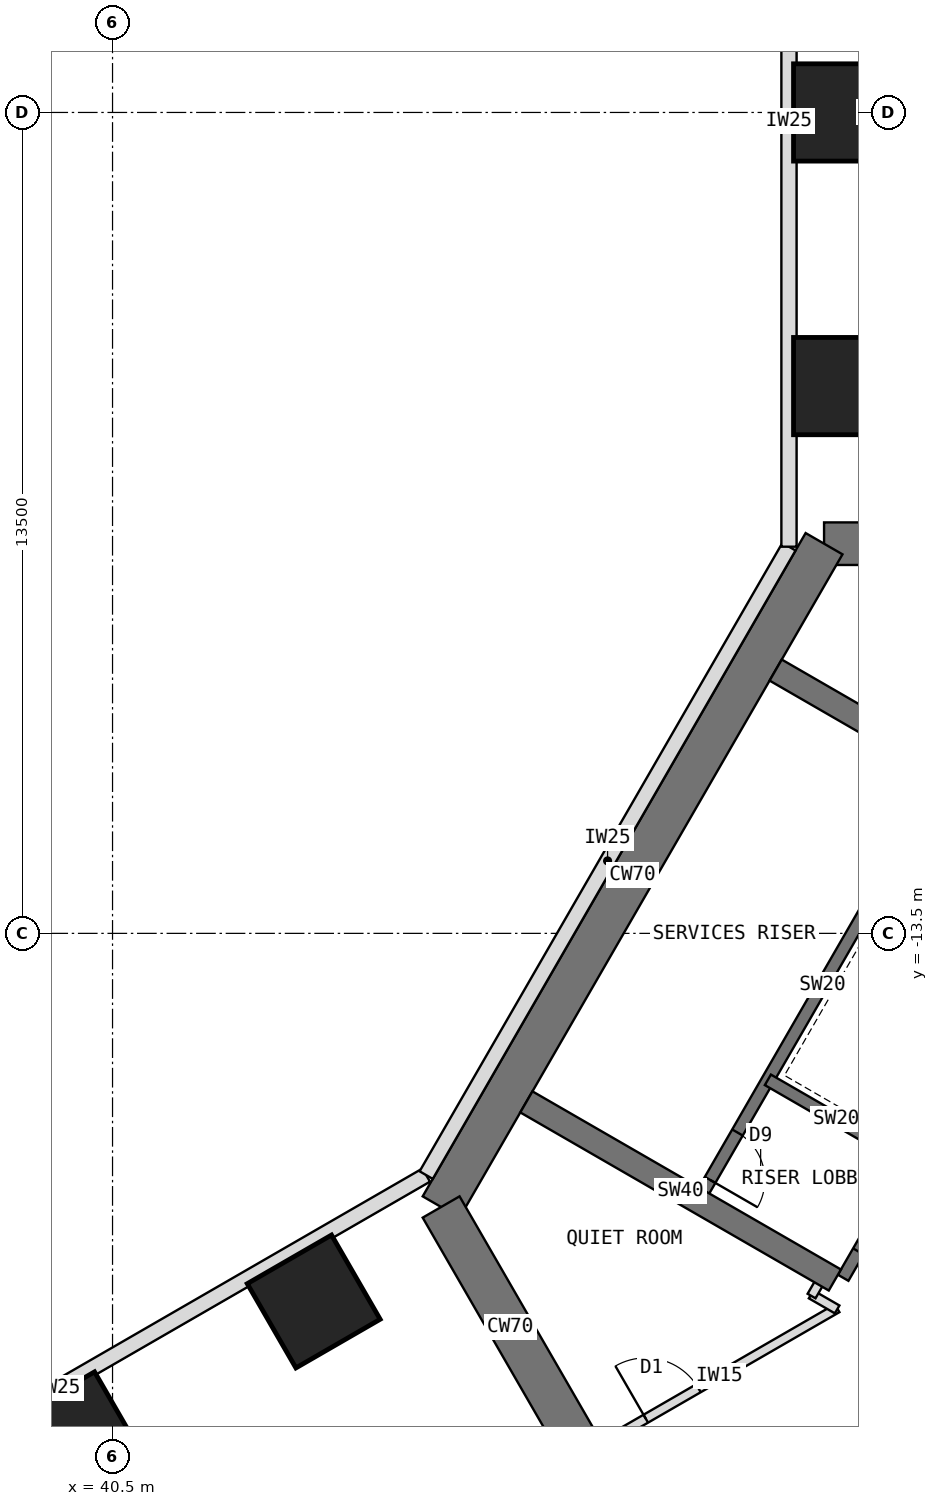
"""IFC4 building model, lengths in metres.
Left out: names, types, materials, properties, quantities, classifications, styles, units other than length and angle.
Written with IfcOpenShell. Run it as: python <this file> out.ifc"""

import sys

from ifc_helpers import new_model, si_unit, direction, frame, frame_2d, origin, origin_2d, place, context, subcontext, project, spatial, rectangle, extrude, element, fill, save


model = new_model("IFC4")
c1 = context("Model", 3, precision=1e-05, world=origin(), true_north=direction((0.0, 1.0)))
c2 = subcontext(c1, "Body", "Model", "MODEL_VIEW")
j1 = project(units=[si_unit("LENGTHUNIT", "METRE"), si_unit("PLANEANGLEUNIT", "RADIAN")], contexts=[c1])
p1 = place(None, origin())
s1 = spatial("IfcSite", under=j1, at=p1, CompositionType="ELEMENT")
p2 = place(p1, origin())
s2 = spatial("IfcBuilding", under=s1, at=p2, CompositionType="ELEMENT")
p3 = place(p2, frame((0.0, 0.0, 5.5)))
s3 = spatial("IfcBuildingStorey", under=s2, at=p3, CompositionType="ELEMENT", Elevation=5.5)
for number, where, z_axis, x_axis in (
    (1, (40.5, -13.5, 0.0), (0.0, 0.0, 1.0), (1.0, 0.0, 0.0)),
    (2, (40.5, 0.0, 0.0), (0.0, 0.0, 1.0), (1.0, 0.0, 0.0)),
):
    element("IfcColumn", number, at=place(p3, frame(where, z_axis=z_axis, x_axis=x_axis)), inside=s3, PredefinedType="COLUMN", context=c2, shape_type="SweptSolid", body=[
        extrude(rectangle(XDim=1.5, YDim=1.5, at=origin_2d()), origin(), (0.0, 0.0, 1.0), 5.0),
    ])
p4 = place(p3, frame((56.75, -7.092, 0.0), z_axis=(0.0, 0.0, 1.0), x_axis=(-1.0, 0.0, 0.0)))
e3 = element("IfcWall", 3, at=p4, inside=s3, PredefinedType="SHEAR", context=c2, shape_type="SweptSolid", body=[
    extrude(rectangle(XDim=4.548, YDim=0.7, at=frame_2d((2.274, 0.0))), origin(), (0.0, 0.0, 1.0), 5.0),
])
p5 = place(p3, frame((52.202, -7.092, 0.0), z_axis=(0.0, 0.0, 1.0), x_axis=(-0.500005998175, -0.866021940709, 0.0)))
e4 = element("IfcWall", 4, at=p5, inside=s3, PredefinedType="SHEAR", context=c2, shape_type="SweptSolid", body=[
    extrude(rectangle(XDim=12.596, YDim=0.7, at=frame_2d((6.298, 0.0))), origin(), (0.0, 0.0, 1.0), 5.0),
])
p6 = place(p3, frame((45.904, -18.0, 0.0), z_axis=(0.0, 0.0, 1.0), x_axis=(0.500024481964, -0.866011268655, 0.0)))
e5 = element("IfcWall", 5, at=p6, inside=s3, PredefinedType="SHEAR", context=c2, shape_type="SweptSolid", body=[
    extrude(rectangle(XDim=4.548, YDim=0.7, at=frame_2d((2.274, 0.0))), origin(), (0.0, 0.0, 1.0), 5.0),
])
for number, where, z_axis, x_axis in (
    (6, (52.5, -4.5, 0.0), (0.0, 0.0, 1.0), (1.0, 0.0, 0.0)),
    (7, (52.5, 0.0, 0.0), (0.0, 0.0, 1.0), (1.0, 0.0, 0.0)),
    (8, (43.809, -19.554, 0.0), (0.0, 0.0, 1.0), (0.866, 0.5, 0.0)),
    (9, (39.912, -21.804, 0.0), (0.0, 0.0, 1.0), (0.866, 0.5, 0.0)),
):
    element("IfcColumn", number, at=place(p3, frame(where, z_axis=z_axis, x_axis=x_axis)), inside=s3, PredefinedType="COLUMN", context=c2, shape_type="SweptSolid", body=[
        extrude(rectangle(XDim=1.6, YDim=1.6, at=origin_2d()), origin(), (0.0, 0.0, 1.0), 5.0),
    ])
p7 = place(p3, frame((56.516, -12.236, 0.0), z_axis=(0.0, 0.0, 1.0), x_axis=(-0.49999894854, -0.866026010844, 0.0)))
e10 = element("IfcWall", 10, at=p7, inside=s3, PredefinedType="SHEAR", context=c2, shape_type="SweptSolid", body=[
    extrude(rectangle(XDim=8.0, YDim=0.2, at=frame_2d((4.0, 0.0))), origin(), (0.0, 0.0, 1.0), 5.0),
])
p8 = place(p7, frame((6.3, 0.0, 0.0)))
e11 = element("IfcOpeningElement", 11, at=p8, cuts=e10, PredefinedType="OPENING", context=c2, shape_type="SweptSolid", body=[
    extrude(rectangle(XDim=1.2, YDim=2.1, at=frame_2d((0.6, 1.05))), frame((0.0, 0.11, 0.0), z_axis=(0.0, -1.0, 0.0), x_axis=(1.0, 0.0, 0.0)), (0.0, 0.0, 1.0), 0.22),
])
for number, where, z_axis, x_axis in (
    (12, (54.98, -14.697, 0.0), (0.0, 0.0, 1.0), (-0.866, 0.5, 0.0)),
    (13, (53.53, -17.209, 0.0), (0.0, 0.0, 1.0), (-0.866, 0.5, 0.0)),
):
    element("IfcWall", number, at=place(p3, frame(where, z_axis=z_axis, x_axis=x_axis)), inside=s3, PredefinedType="SHEAR", context=c2, shape_type="SweptSolid", body=[
        extrude(rectangle(XDim=2.6, YDim=0.2, at=frame_2d((1.3, 0.0))), origin(), (0.0, 0.0, 1.0), 5.0),
    ])
p9 = place(p3, frame((54.178, -10.886, 0.0), z_axis=(0.0, 0.0, 1.0), x_axis=(-0.49999894854, -0.866026010844, 0.0)))
e14 = element("IfcWall", 14, at=p9, inside=s3, PredefinedType="SHEAR", context=c2, shape_type="SweptSolid", body=[
    extrude(rectangle(XDim=8.0, YDim=0.2, at=frame_2d((4.0, 0.0))), origin(), (0.0, 0.0, 1.0), 5.0),
])
p10 = place(p9, frame((6.8, 0.0, 0.0)))
e15 = element("IfcOpeningElement", 15, at=p10, cuts=e14, PredefinedType="OPENING", context=c2, shape_type="SweptSolid", body=[
    extrude(rectangle(XDim=0.9, YDim=2.1, at=frame_2d((0.45, 1.05))), frame((0.0, 0.11, 0.0), z_axis=(0.0, -1.0, 0.0), x_axis=(1.0, 0.0, 0.0)), (0.0, 0.0, 1.0), 0.22),
])
for number, where, z_axis, x_axis in (
    (16, (52.38, -19.201, 0.0), (0.0, 0.0, 1.0), (-0.866, 0.5, 0.0)),
    (17, (56.48, -12.099, 0.0), (0.0, 0.0, 1.0), (-0.866, 0.5, 0.0)),
):
    element("IfcWall", number, at=place(p3, frame(where, z_axis=z_axis, x_axis=x_axis)), inside=s3, PredefinedType="SHEAR", context=c2, shape_type="SweptSolid", body=[
        extrude(rectangle(XDim=5.858, YDim=0.4, at=frame_2d((2.929, 0.0))), origin(), (0.0, 0.0, 1.0), 5.0),
    ])
p11 = place(p3, frame((48.548, -21.898, 0.0), z_axis=(0.0, 0.0, 1.0), x_axis=(0.866025445582, 0.499999927604, 0.0)))
e18 = element("IfcWall", 18, at=p11, inside=s3, PredefinedType="PARTITIONING", context=c2, shape_type="SweptSolid", body=[
    extrude(rectangle(XDim=4.468, YDim=0.15, at=frame_2d((2.234, 0.0))), origin(), (0.0, 0.0, 1.0), 4.65),
])
p12 = place(p11, frame((0.834, 0.0, 0.0)))
e19 = element("IfcOpeningElement", 19, at=p12, cuts=e18, PredefinedType="OPENING", context=c2, shape_type="SweptSolid", body=[
    extrude(rectangle(XDim=1.0, YDim=2.1, at=frame_2d((0.5, 1.05))), frame((0.0, 0.085, 0.0), z_axis=(0.0, -1.0, 0.0), x_axis=(1.0, 0.0, 0.0)), (0.0, 0.0, 1.0), 0.17),
])
p13 = place(p3, frame((52.417, -19.684, 0.0), z_axis=(0.0, 0.0, 1.0), x_axis=(-0.865831790172, 0.50033519877, 0.0)))
e20 = element("IfcWall", 20, at=p13, inside=s3, PredefinedType="PARTITIONING", context=c2, shape_type="SweptSolid", body=[
    extrude(rectangle(XDim=0.494, YDim=0.15, at=frame_2d((0.247, 0.0))), origin(), (0.0, 0.0, 1.0), 4.65),
])
p14 = place(p3, frame((51.997, -19.464, 0.0), z_axis=(0.0, 0.0, 1.0), x_axis=(0.499804398801, 0.866138304741, 0.0)))
e21 = element("IfcWall", 21, at=p14, inside=s3, PredefinedType="PARTITIONING", context=c2, shape_type="SweptSolid", body=[
    extrude(rectangle(XDim=0.43, YDim=0.15, at=frame_2d((0.215, 0.0))), origin(), (0.0, 0.0, 1.0), 4.65),
])
p15 = place(p3, frame((40.5, -20.252, 0.0), z_axis=(0.0, 0.0, 1.0), x_axis=(0.0, 1.0, 0.0)))
e22 = element("IfcWall", 22, at=p15, inside=s3, PredefinedType="PARTITIONING", context=c2, shape_type="SweptSolid", body=[
    extrude(rectangle(XDim=6.752, YDim=0.2, at=frame_2d((3.376, 0.0))), origin(), (0.0, 0.0, 1.0), 4.65),
])
p16 = place(p15, frame((2.476, 0.0, 0.0)))
e23 = element("IfcOpeningElement", 23, at=p16, cuts=e22, PredefinedType="OPENING", context=c2, shape_type="SweptSolid", body=[
    extrude(rectangle(XDim=1.8, YDim=2.4, at=frame_2d((0.9, 1.2))), frame((0.0, 0.11, 0.0), z_axis=(0.0, -1.0, 0.0), x_axis=(1.0, 0.0, 0.0)), (0.0, 0.0, 1.0), 0.22),
])
p17 = place(p3, frame((27.0, -13.5, 0.0), z_axis=(0.0, 0.0, 1.0), x_axis=(1.0, 0.0, 0.0)))
e24 = element("IfcWall", 24, at=p17, inside=s3, PredefinedType="PARTITIONING", context=c2, shape_type="SweptSolid", body=[
    extrude(rectangle(XDim=13.5, YDim=0.2, at=frame_2d((6.75, 0.0))), origin(), (0.0, 0.0, 1.0), 3.25),
])
p18 = place(p3, frame((40.5, -13.5, 0.0), z_axis=(0.0, 0.0, 1.0), x_axis=(0.0, 1.0, 0.0)))
e25 = element("IfcWall", 25, at=p18, inside=s3, PredefinedType="PARTITIONING", context=c2, shape_type="SweptSolid", body=[
    extrude(rectangle(XDim=13.5, YDim=0.2, at=frame_2d((6.75, 0.0))), origin(), (0.0, 0.0, 1.0), 3.25),
])
p19 = place(p18, frame((5.85, 0.0, 0.0)))
e26 = element("IfcOpeningElement", 26, at=p19, cuts=e25, PredefinedType="OPENING", context=c2, shape_type="SweptSolid", body=[
    extrude(rectangle(XDim=1.8, YDim=2.4, at=frame_2d((0.9, 1.2))), frame((0.0, 0.11, 0.0), z_axis=(0.0, -1.0, 0.0), x_axis=(1.0, 0.0, 0.0)), (0.0, 0.0, 1.0), 0.22),
])
p20 = place(p3, frame((40.5, 0.0, 0.0), z_axis=(0.0, 0.0, 1.0), x_axis=(0.0, 1.0, 0.0)))
e27 = element("IfcWall", 27, at=p20, inside=s3, PredefinedType="PARTITIONING", context=c2, shape_type="SweptSolid", body=[
    extrude(rectangle(XDim=13.5, YDim=0.2, at=frame_2d((6.75, 0.0))), origin(), (0.0, 0.0, 1.0), 3.25),
])
p21 = place(p20, frame((5.85, 0.0, 0.0)))
e28 = element("IfcOpeningElement", 28, at=p21, cuts=e27, PredefinedType="OPENING", context=c2, shape_type="SweptSolid", body=[
    extrude(rectangle(XDim=1.8, YDim=2.4, at=frame_2d((0.9, 1.2))), frame((0.0, 0.11, 0.0), z_axis=(0.0, -1.0, 0.0), x_axis=(1.0, 0.0, 0.0)), (0.0, 0.0, 1.0), 0.22),
])
p22 = place(p3, frame((40.5, 0.0, 0.0), z_axis=(0.0, 0.0, 1.0), x_axis=(1.0, 0.0, 0.0)))
e29 = element("IfcWall", 29, at=p22, inside=s3, PredefinedType="PARTITIONING", context=c2, shape_type="SweptSolid", body=[
    extrude(rectangle(XDim=10.95, YDim=0.2, at=frame_2d((5.475, 0.0))), origin(), (0.0, 0.0, 1.0), 4.65),
])
p23 = place(p22, frame((4.575, 0.0, 0.0)))
e30 = element("IfcOpeningElement", 30, at=p23, cuts=e29, PredefinedType="OPENING", context=c2, shape_type="SweptSolid", body=[
    extrude(rectangle(XDim=1.8, YDim=2.4, at=frame_2d((0.9, 1.2))), frame((0.0, 0.11, 0.0), z_axis=(0.0, -1.0, 0.0), x_axis=(1.0, 0.0, 0.0)), (0.0, 0.0, 1.0), 0.22),
])
p24 = place(p3, frame((33.52, -24.484, 0.0), z_axis=(0.0, 0.0, 1.0), x_axis=(0.866027500821, 0.499996367808, 0.0)))
e31 = element("IfcWall", 31, at=p24, inside=s3, PredefinedType="STANDARD", context=c2, shape_type="SweptSolid", body=[
    extrude(rectangle(XDim=14.016, YDim=0.25, at=frame_2d((7.008, 0.0))), origin(), (0.0, 0.0, 1.0), 4.65),
])
p25 = place(p3, frame((45.658, -17.476, 0.0), z_axis=(0.0, 0.0, 1.0), x_axis=(0.499996365031, 0.866027502425, 0.0)))
e32 = element("IfcWall", 32, at=p25, inside=s3, PredefinedType="STANDARD", context=c2, shape_type="SweptSolid", body=[
    extrude(rectangle(XDim=11.933, YDim=0.25, at=frame_2d((5.967, 0.0))), origin(), (0.0, 0.0, 1.0), 4.65),
])
p26 = place(p3, frame((51.625, -7.141, 0.0), z_axis=(0.0, 0.0, 1.0), x_axis=(0.0, 1.0, 0.0)))
e33 = element("IfcWall", 33, at=p26, inside=s3, PredefinedType="STANDARD", context=c2, shape_type="SweptSolid", body=[
    extrude(rectangle(XDim=14.016, YDim=0.25, at=frame_2d((7.008, 0.0))), origin(), (0.0, 0.0, 1.0), 4.65),
])
p27 = place(p8, origin())
e34 = element("IfcDoor", 34, at=p27, inside=s3, OperationType="SINGLE_SWING_RIGHT", PredefinedType="DOOR", context=c2, shape_type="SweptSolid", body=[
    extrude(rectangle(XDim=1.2, YDim=2.1, at=frame_2d((0.6, 1.05))), frame((0.0, 0.025, 0.0), z_axis=(0.0, -1.0, 0.0), x_axis=(1.0, 0.0, 0.0)), (0.0, 0.0, 1.0), 0.05),
])
fill(e11, e34)
p28 = place(p10, origin())
e35 = element("IfcDoor", 35, at=p28, inside=s3, OperationType="SINGLE_SWING_RIGHT", PredefinedType="DOOR", context=c2, shape_type="SweptSolid", body=[
    extrude(rectangle(XDim=0.9, YDim=2.1, at=frame_2d((0.45, 1.05))), frame((0.0, 0.025, 0.0), z_axis=(0.0, -1.0, 0.0), x_axis=(1.0, 0.0, 0.0)), (0.0, 0.0, 1.0), 0.05),
])
fill(e15, e35)
p29 = place(p12, origin())
e36 = element("IfcDoor", 36, at=p29, inside=s3, OperationType="SINGLE_SWING_LEFT", PredefinedType="DOOR", context=c2, shape_type="SweptSolid", body=[
    extrude(rectangle(XDim=1.0, YDim=2.1, at=frame_2d((0.5, 1.05))), frame((0.0, 0.025, 0.0), z_axis=(0.0, -1.0, 0.0), x_axis=(1.0, 0.0, 0.0)), (0.0, 0.0, 1.0), 0.05),
])
fill(e19, e36)
p30 = place(p16, origin())
e37 = element("IfcDoor", 37, at=p30, inside=s3, OperationType="DOUBLE_DOOR_DOUBLE_SWING", PredefinedType="DOOR", context=c2, shape_type="SweptSolid", body=[
    extrude(rectangle(XDim=1.8, YDim=2.4, at=frame_2d((0.9, 1.2))), frame((0.0, 0.025, 0.0), z_axis=(0.0, -1.0, 0.0), x_axis=(1.0, 0.0, 0.0)), (0.0, 0.0, 1.0), 0.05),
])
fill(e23, e37)
p31 = place(p23, origin())
e38 = element("IfcDoor", 38, at=p31, inside=s3, OperationType="DOUBLE_DOOR_DOUBLE_SWING", PredefinedType="DOOR", context=c2, shape_type="SweptSolid", body=[
    extrude(rectangle(XDim=1.8, YDim=2.4, at=frame_2d((0.9, 1.2))), frame((0.0, 0.025, 0.0), z_axis=(0.0, -1.0, 0.0), x_axis=(1.0, 0.0, 0.0)), (0.0, 0.0, 1.0), 0.05),
])
fill(e30, e38)
p32 = place(p19, origin())
e39 = element("IfcDoor", 39, at=p32, inside=s3, OperationType="DOUBLE_DOOR_DOUBLE_SWING", PredefinedType="DOOR", context=c2, shape_type="SweptSolid", body=[
    extrude(rectangle(XDim=1.8, YDim=2.4, at=frame_2d((0.9, 1.2))), frame((0.0, 0.025, 0.0), z_axis=(0.0, -1.0, 0.0), x_axis=(1.0, 0.0, 0.0)), (0.0, 0.0, 1.0), 0.05),
])
fill(e26, e39)
save(model, sys.argv[1])
